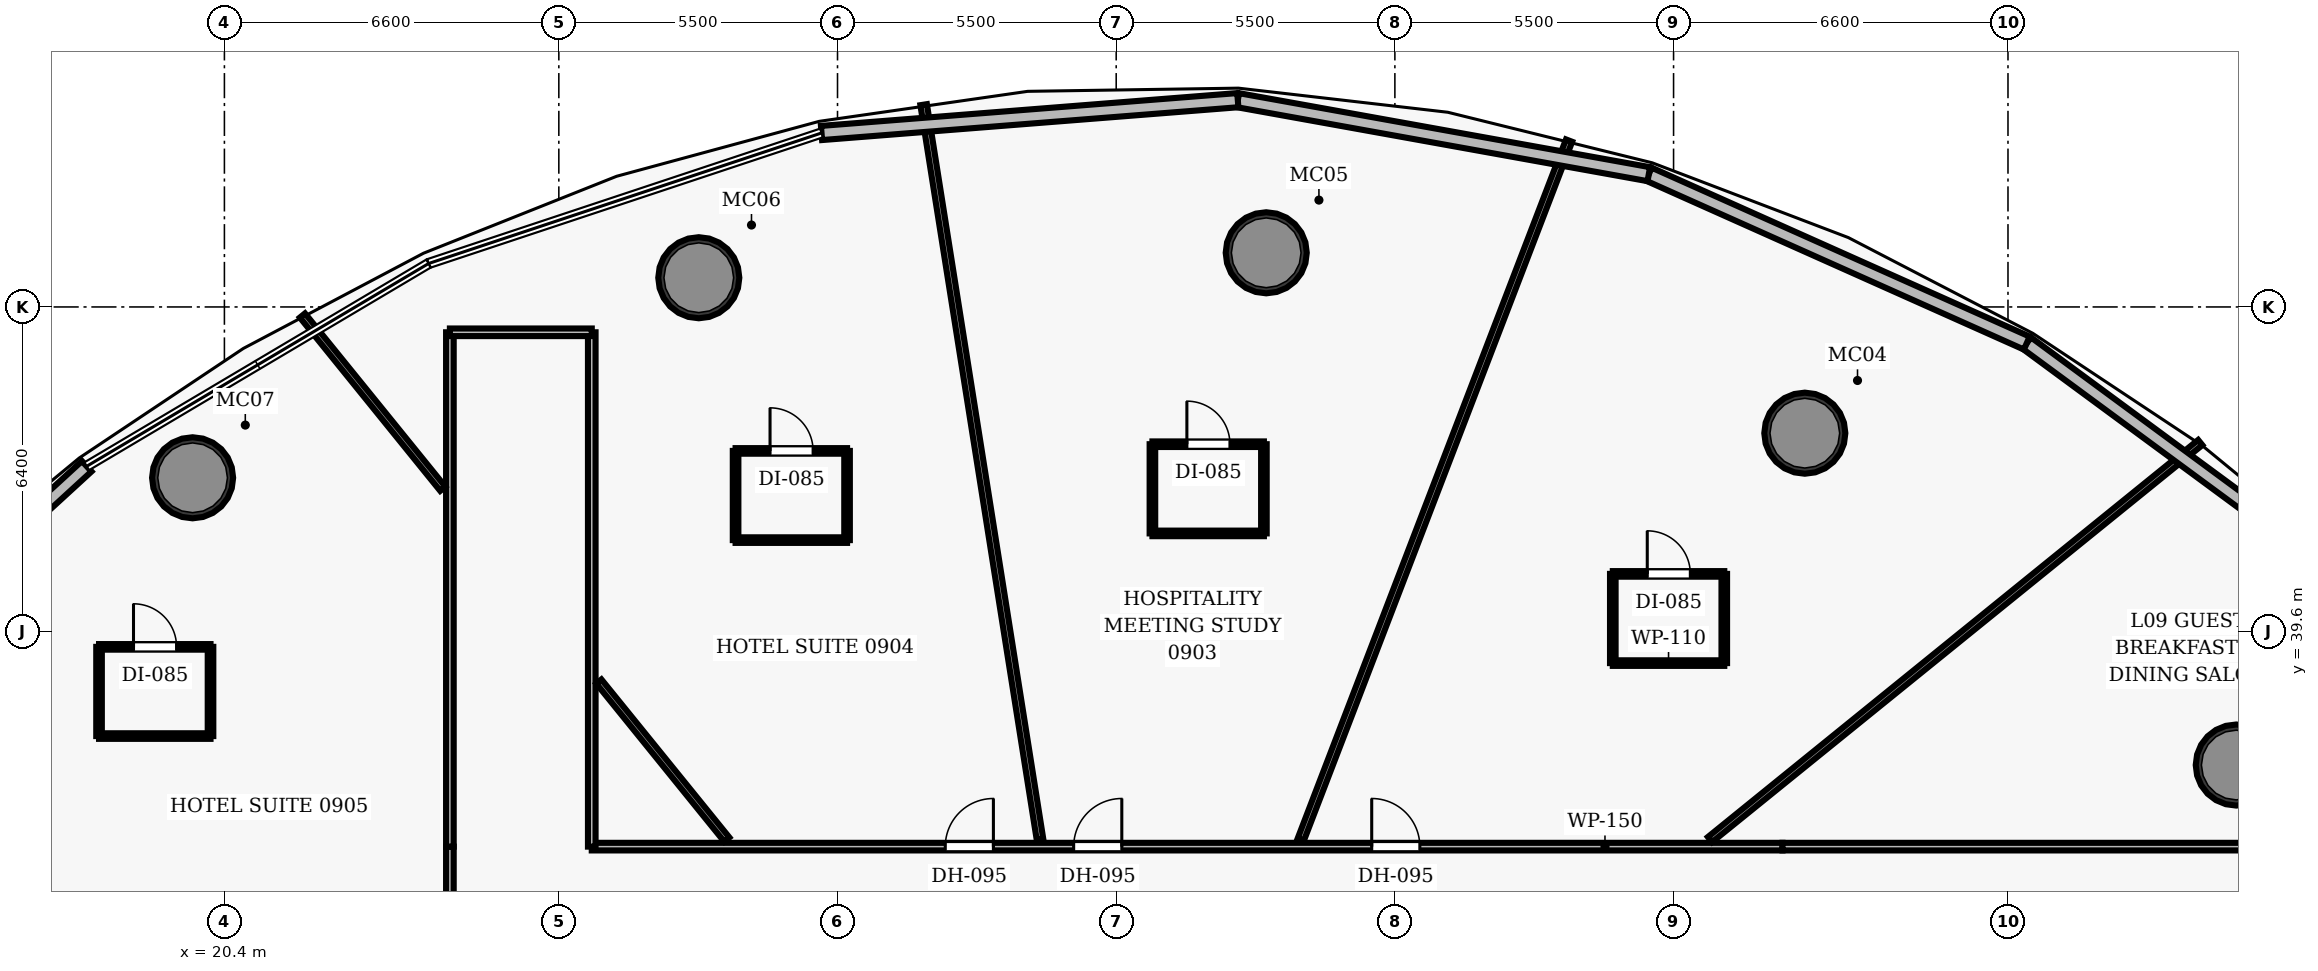
"""IFC4 building model, lengths in metres.
Left out: names, types, materials, properties, quantities, classifications, styles, units other than length and angle.
Written with IfcOpenShell. Run it as: python <this file> out.ifc"""

import sys

from ifc_helpers import new_model, si_unit, direction, frame, frame_2d, origin, origin_2d, place, context, subcontext, project, spatial, rectangle, hollow_circle, extrude, element, fill, save


model = new_model("IFC4")
c1 = context("Model", 3, precision=1e-05, world=origin(), true_north=direction((0.0, 1.0)))
c2 = subcontext(c1, "Body", "Model", "MODEL_VIEW")
j1 = project(units=[si_unit("LENGTHUNIT", "METRE"), si_unit("PLANEANGLEUNIT", "RADIAN")], contexts=[c1])
p1 = place(None, origin())
s1 = spatial("IfcSite", under=j1, at=p1, CompositionType="ELEMENT")
p2 = place(p1, origin())
s2 = spatial("IfcBuilding", under=s1, at=p2, CompositionType="ELEMENT")
p3 = place(p2, frame((0.0, 0.0, 48.4)))
s3 = spatial("IfcBuildingStorey", under=s2, at=p3, CompositionType="ELEMENT", Elevation=48.4)
for number, where, z_axis, x_axis in (
    (1, (60.105, 36.96, 0.0), (0.0, 0.0, 1.0), (1.0, 0.0, 0.0)),
    (2, (51.59, 43.509, 0.0), (0.0, 0.0, 1.0), (1.0, 0.0, 0.0)),
    (3, (40.961, 47.069, 0.0), (0.0, 0.0, 1.0), (1.0, 0.0, 0.0)),
    (4, (29.762, 46.577, 0.0), (0.0, 0.0, 1.0), (1.0, 0.0, 0.0)),
    (5, (19.772, 42.629, 0.0), (0.0, 0.0, 1.0), (1.0, 0.0, 0.0)),
):
    element("IfcColumn", number, at=place(p3, frame(where, z_axis=z_axis, x_axis=x_axis)), inside=s3, PredefinedType="COLUMN", context=c2, shape_type="SweptSolid", body=[
        extrude(hollow_circle(Radius=0.8, WallThickness=0.06, at=origin_2d()), origin(), (0.0, 0.0, 1.0), 3.5),
    ])
p4 = place(p3, frame((27.65, 35.35, 0.0), z_axis=(0.0, 0.0, 1.0), x_axis=(1.0, 0.0, 0.0)))
e6 = element("IfcWall", 6, at=p4, inside=s3, PredefinedType="PARTITIONING", context=c2, shape_type="SweptSolid", body=[
    extrude(rectangle(XDim=23.5, YDim=0.15, at=frame_2d((11.75, 0.0))), origin(), (0.0, 0.0, 1.0), 2.6),
])
p5 = place(p4, frame((15.393, 0.0, 0.0)))
e7 = element("IfcOpeningElement", 7, at=p5, cuts=e6, PredefinedType="OPENING", context=c2, shape_type="SweptSolid", body=[
    extrude(rectangle(XDim=0.95, YDim=2.15, at=frame_2d((0.475, 1.075))), frame((0.0, 0.085, 0.0), z_axis=(0.0, -1.0, 0.0), x_axis=(1.0, 0.0, 0.0)), (0.0, 0.0, 1.0), 0.17),
])
p6 = place(p4, frame((9.511, 0.0, 0.0)))
e8 = element("IfcOpeningElement", 8, at=p6, cuts=e6, PredefinedType="OPENING", context=c2, shape_type="SweptSolid", body=[
    extrude(rectangle(XDim=0.95, YDim=2.15, at=frame_2d((0.475, 1.075))), frame((0.0, 0.085, 0.0), z_axis=(0.0, -1.0, 0.0), x_axis=(1.0, 0.0, 0.0)), (0.0, 0.0, 1.0), 0.17),
])
p7 = place(p4, frame((6.977, 0.0, 0.0)))
e9 = element("IfcOpeningElement", 9, at=p7, cuts=e6, PredefinedType="OPENING", context=c2, shape_type="SweptSolid", body=[
    extrude(rectangle(XDim=0.95, YDim=2.15, at=frame_2d((0.475, 1.075))), frame((0.0, 0.085, 0.0), z_axis=(0.0, -1.0, 0.0), x_axis=(1.0, 0.0, 0.0)), (0.0, 0.0, 1.0), 0.17),
])
p8 = place(p3, frame((24.85, 19.45, 0.0), z_axis=(0.0, 0.0, 1.0), x_axis=(0.0, 1.0, 0.0)))
e10 = element("IfcWall", 10, at=p8, inside=s3, PredefinedType="PARTITIONING", context=c2, shape_type="SweptSolid", body=[
    extrude(rectangle(XDim=15.9, YDim=0.15, at=frame_2d((7.95, 0.0))), origin(), (0.0, 0.0, 1.0), 2.6),
])
p9 = place(p8, frame((12.466, 0.0, 0.0)))
e11 = element("IfcOpeningElement", 11, at=p9, cuts=e10, PredefinedType="OPENING", context=c2, shape_type="SweptSolid", body=[
    extrude(rectangle(XDim=0.95, YDim=2.15, at=frame_2d((0.475, 1.075))), frame((0.0, 0.085, 0.0), z_axis=(0.0, -1.0, 0.0), x_axis=(1.0, 0.0, 0.0)), (0.0, 0.0, 1.0), 0.17),
])
p10 = place(p8, frame((7.571, 0.0, 0.0)))
e12 = element("IfcOpeningElement", 12, at=p10, cuts=e10, PredefinedType="OPENING", context=c2, shape_type="SweptSolid", body=[
    extrude(rectangle(XDim=0.95, YDim=2.15, at=frame_2d((0.475, 1.075))), frame((0.0, 0.085, 0.0), z_axis=(0.0, -1.0, 0.0), x_axis=(1.0, 0.0, 0.0)), (0.0, 0.0, 1.0), 0.17),
])
p11 = place(p8, frame((2.609, 0.0, 0.0)))
e13 = element("IfcOpeningElement", 13, at=p11, cuts=e10, PredefinedType="OPENING", context=c2, shape_type="SweptSolid", body=[
    extrude(rectangle(XDim=0.95, YDim=2.15, at=frame_2d((0.475, 1.075))), frame((0.0, 0.085, 0.0), z_axis=(0.0, -1.0, 0.0), x_axis=(1.0, 0.0, 0.0)), (0.0, 0.0, 1.0), 0.17),
])
p12 = place(p3, frame((51.15, 35.35, 0.0), z_axis=(0.0, 0.0, 1.0), x_axis=(1.0, 0.0, 0.0)))
e14 = element("IfcWall", 14, at=p12, inside=s3, PredefinedType="PARTITIONING", context=c2, shape_type="SweptSolid", body=[
    extrude(rectangle(XDim=14.35, YDim=0.15, at=frame_2d((7.175, 0.0))), origin(), (0.0, 0.0, 1.0), 2.6),
])
for number, where, z_axis, x_axis in (
    (15, (24.85, 35.35, 0.0), (0.0, 0.0, 1.0), (0.0, 1.0, 0.0)),
    (16, (27.65, 35.35, 0.0), (0.0, 0.0, 1.0), (0.0, 1.0, 0.0)),
):
    element("IfcWall", number, at=place(p3, frame(where, z_axis=z_axis, x_axis=x_axis)), inside=s3, PredefinedType="PARTITIONING", context=c2, shape_type="SweptSolid", body=[
        extrude(rectangle(XDim=10.15, YDim=0.15, at=frame_2d((5.075, 0.0))), origin(), (0.0, 0.0, 1.0), 2.6),
    ])
p13 = place(p3, frame((24.85, 45.5, 0.0), z_axis=(0.0, 0.0, 1.0), x_axis=(1.0, 0.0, 0.0)))
e17 = element("IfcWall", 17, at=p13, inside=s3, PredefinedType="PARTITIONING", context=c2, shape_type="SweptSolid", body=[
    extrude(rectangle(XDim=2.8, YDim=0.15, at=frame_2d((1.4, 0.0))), origin(), (0.0, 0.0, 1.0), 2.6),
])
p14 = place(p3, frame((49.719, 35.49, 0.0), z_axis=(0.0, 0.0, 1.0), x_axis=(0.777145304008, 0.62932120293, 0.0)))
e18 = element("IfcWall", 18, at=p14, inside=s3, PredefinedType="PARTITIONING", context=c2, shape_type="SweptSolid", body=[
    extrude(rectangle(XDim=12.449, YDim=0.13, at=frame_2d((6.225, 0.0))), origin(), (0.0, 0.0, 1.0), 2.6),
])
p15 = place(p3, frame((41.643, 35.49, 0.0), z_axis=(0.0, 0.0, 1.0), x_axis=(0.358374426788, 0.933577940091, 0.0)))
e19 = element("IfcWall", 19, at=p15, inside=s3, PredefinedType="PARTITIONING", context=c2, shape_type="SweptSolid", body=[
    extrude(rectangle(XDim=14.775, YDim=0.13, at=frame_2d((7.387, 0.0))), origin(), (0.0, 0.0, 1.0), 2.6),
])
p16 = place(p3, frame((36.497, 35.49, 0.0), z_axis=(0.0, 0.0, 1.0), x_axis=(-0.15643388506, 0.987688432455, 0.0)))
e20 = element("IfcWall", 20, at=p16, inside=s3, PredefinedType="PARTITIONING", context=c2, shape_type="SweptSolid", body=[
    extrude(rectangle(XDim=14.683, YDim=0.13, at=frame_2d((7.341, 0.0))), origin(), (0.0, 0.0, 1.0), 2.6),
])
p17 = place(p3, frame((30.315, 35.49, 0.0), z_axis=(0.0, 0.0, 1.0), x_axis=(-0.629306741086, 0.777157014782, 0.0)))
e21 = element("IfcWall", 21, at=p17, inside=s3, PredefinedType="PARTITIONING", context=c2, shape_type="SweptSolid", body=[
    extrude(rectangle(XDim=4.013, YDim=0.13, at=frame_2d((2.006, 0.0))), origin(), (0.0, 0.0, 1.0), 2.6),
])
p18 = place(p3, frame((24.71, 42.412, 0.0), z_axis=(0.0, 0.0, 1.0), x_axis=(-0.629345031815, 0.777126007112, 0.0)))
e22 = element("IfcWall", 22, at=p18, inside=s3, PredefinedType="PARTITIONING", context=c2, shape_type="SweptSolid", body=[
    extrude(rectangle(XDim=4.401, YDim=0.13, at=frame_2d((2.201, 0.0))), origin(), (0.0, 0.0, 1.0), 2.6),
])
p19 = place(p3, frame((24.71, 31.102, 0.0), z_axis=(0.0, 0.0, 1.0), x_axis=(-0.933582813914, 0.358361730049, 0.0)))
e23 = element("IfcWall", 23, at=p19, inside=s3, PredefinedType="PARTITIONING", context=c2, shape_type="SweptSolid", body=[
    extrude(rectangle(XDim=14.815, YDim=0.13, at=frame_2d((7.408, 0.0))), origin(), (0.0, 0.0, 1.0), 2.6),
])
p20 = place(p3, frame((47.801, 38.972, 0.0), z_axis=(0.0, 0.0, 1.0), x_axis=(1.0, 0.0, 0.0)))
e24 = element("IfcWall", 24, at=p20, inside=s3, PredefinedType="PARTITIONING", context=c2, shape_type="SweptSolid", body=[
    extrude(rectangle(XDim=2.2, YDim=0.11, at=frame_2d((1.1, 0.0))), origin(), (0.0, 0.0, 1.0), 2.6),
])
p21 = place(p3, frame((47.801, 40.732, 0.0), z_axis=(0.0, 0.0, 1.0), x_axis=(1.0, 0.0, 0.0)))
e25 = element("IfcWall", 25, at=p21, inside=s3, PredefinedType="PARTITIONING", context=c2, shape_type="SweptSolid", body=[
    extrude(rectangle(XDim=2.2, YDim=0.11, at=frame_2d((1.1, 0.0))), origin(), (0.0, 0.0, 1.0), 2.6),
])
p22 = place(p21, frame((0.68, 0.0, 0.0)))
e26 = element("IfcOpeningElement", 26, at=p22, cuts=e25, PredefinedType="OPENING", context=c2, shape_type="SweptSolid", body=[
    extrude(rectangle(XDim=0.85, YDim=2.1, at=frame_2d((0.425, 1.05))), frame((0.0, 0.065, 0.0), z_axis=(0.0, -1.0, 0.0), x_axis=(1.0, 0.0, 0.0)), (0.0, 0.0, 1.0), 0.13),
])
for number, where, z_axis, x_axis in (
    (27, (47.801, 38.972, 0.0), (0.0, 0.0, 1.0), (0.0, 1.0, 0.0)),
    (28, (50.001, 38.972, 0.0), (0.0, 0.0, 1.0), (0.0, 1.0, 0.0)),
):
    element("IfcWall", number, at=place(p3, frame(where, z_axis=z_axis, x_axis=x_axis)), inside=s3, PredefinedType="PARTITIONING", context=c2, shape_type="SweptSolid", body=[
        extrude(rectangle(XDim=1.76, YDim=0.11, at=frame_2d((0.88, 0.0))), origin(), (0.0, 0.0, 1.0), 2.6),
    ])
p23 = place(p3, frame((38.715, 41.531, 0.0), z_axis=(0.0, 0.0, 1.0), x_axis=(1.0, 0.0, 0.0)))
e29 = element("IfcWall", 29, at=p23, inside=s3, PredefinedType="PARTITIONING", context=c2, shape_type="SweptSolid", body=[
    extrude(rectangle(XDim=2.2, YDim=0.11, at=frame_2d((1.1, 0.0))), origin(), (0.0, 0.0, 1.0), 2.6),
])
p24 = place(p3, frame((38.715, 43.291, 0.0), z_axis=(0.0, 0.0, 1.0), x_axis=(1.0, 0.0, 0.0)))
e30 = element("IfcWall", 30, at=p24, inside=s3, PredefinedType="PARTITIONING", context=c2, shape_type="SweptSolid", body=[
    extrude(rectangle(XDim=2.2, YDim=0.11, at=frame_2d((1.1, 0.0))), origin(), (0.0, 0.0, 1.0), 2.6),
])
p25 = place(p24, frame((0.68, 0.0, 0.0)))
e31 = element("IfcOpeningElement", 31, at=p25, cuts=e30, PredefinedType="OPENING", context=c2, shape_type="SweptSolid", body=[
    extrude(rectangle(XDim=0.85, YDim=2.1, at=frame_2d((0.425, 1.05))), frame((0.0, 0.065, 0.0), z_axis=(0.0, -1.0, 0.0), x_axis=(1.0, 0.0, 0.0)), (0.0, 0.0, 1.0), 0.13),
])
for number, where, z_axis, x_axis in (
    (32, (38.715, 41.531, 0.0), (0.0, 0.0, 1.0), (0.0, 1.0, 0.0)),
    (33, (40.915, 41.531, 0.0), (0.0, 0.0, 1.0), (0.0, 1.0, 0.0)),
):
    element("IfcWall", number, at=place(p3, frame(where, z_axis=z_axis, x_axis=x_axis)), inside=s3, PredefinedType="PARTITIONING", context=c2, shape_type="SweptSolid", body=[
        extrude(rectangle(XDim=1.76, YDim=0.11, at=frame_2d((0.88, 0.0))), origin(), (0.0, 0.0, 1.0), 2.6),
    ])
p26 = place(p3, frame((30.488, 41.399, 0.0), z_axis=(0.0, 0.0, 1.0), x_axis=(1.0, 0.0, 0.0)))
e34 = element("IfcWall", 34, at=p26, inside=s3, PredefinedType="PARTITIONING", context=c2, shape_type="SweptSolid", body=[
    extrude(rectangle(XDim=2.2, YDim=0.11, at=frame_2d((1.1, 0.0))), origin(), (0.0, 0.0, 1.0), 2.6),
])
p27 = place(p3, frame((30.488, 43.159, 0.0), z_axis=(0.0, 0.0, 1.0), x_axis=(1.0, 0.0, 0.0)))
e35 = element("IfcWall", 35, at=p27, inside=s3, PredefinedType="PARTITIONING", context=c2, shape_type="SweptSolid", body=[
    extrude(rectangle(XDim=2.2, YDim=0.11, at=frame_2d((1.1, 0.0))), origin(), (0.0, 0.0, 1.0), 2.6),
])
p28 = place(p27, frame((0.68, 0.0, 0.0)))
e36 = element("IfcOpeningElement", 36, at=p28, cuts=e35, PredefinedType="OPENING", context=c2, shape_type="SweptSolid", body=[
    extrude(rectangle(XDim=0.85, YDim=2.1, at=frame_2d((0.425, 1.05))), frame((0.0, 0.065, 0.0), z_axis=(0.0, -1.0, 0.0), x_axis=(1.0, 0.0, 0.0)), (0.0, 0.0, 1.0), 0.13),
])
for number, where, z_axis, x_axis in (
    (37, (30.488, 41.399, 0.0), (0.0, 0.0, 1.0), (0.0, 1.0, 0.0)),
    (38, (32.688, 41.399, 0.0), (0.0, 0.0, 1.0), (0.0, 1.0, 0.0)),
):
    element("IfcWall", number, at=place(p3, frame(where, z_axis=z_axis, x_axis=x_axis)), inside=s3, PredefinedType="PARTITIONING", context=c2, shape_type="SweptSolid", body=[
        extrude(rectangle(XDim=1.76, YDim=0.11, at=frame_2d((0.88, 0.0))), origin(), (0.0, 0.0, 1.0), 2.6),
    ])
p29 = place(p3, frame((17.926, 37.532, 0.0), z_axis=(0.0, 0.0, 1.0), x_axis=(1.0, 0.0, 0.0)))
e39 = element("IfcWall", 39, at=p29, inside=s3, PredefinedType="PARTITIONING", context=c2, shape_type="SweptSolid", body=[
    extrude(rectangle(XDim=2.2, YDim=0.11, at=frame_2d((1.1, 0.0))), origin(), (0.0, 0.0, 1.0), 2.6),
])
p30 = place(p3, frame((17.926, 39.292, 0.0), z_axis=(0.0, 0.0, 1.0), x_axis=(1.0, 0.0, 0.0)))
e40 = element("IfcWall", 40, at=p30, inside=s3, PredefinedType="PARTITIONING", context=c2, shape_type="SweptSolid", body=[
    extrude(rectangle(XDim=2.2, YDim=0.11, at=frame_2d((1.1, 0.0))), origin(), (0.0, 0.0, 1.0), 2.6),
])
p31 = place(p30, frame((0.68, 0.0, 0.0)))
e41 = element("IfcOpeningElement", 41, at=p31, cuts=e40, PredefinedType="OPENING", context=c2, shape_type="SweptSolid", body=[
    extrude(rectangle(XDim=0.85, YDim=2.1, at=frame_2d((0.425, 1.05))), frame((0.0, 0.065, 0.0), z_axis=(0.0, -1.0, 0.0), x_axis=(1.0, 0.0, 0.0)), (0.0, 0.0, 1.0), 0.13),
])
for number, where, z_axis, x_axis in (
    (42, (17.926, 37.532, 0.0), (0.0, 0.0, 1.0), (0.0, 1.0, 0.0)),
    (43, (20.126, 37.532, 0.0), (0.0, 0.0, 1.0), (0.0, 1.0, 0.0)),
):
    element("IfcWall", number, at=place(p3, frame(where, z_axis=z_axis, x_axis=x_axis)), inside=s3, PredefinedType="PARTITIONING", context=c2, shape_type="SweptSolid", body=[
        extrude(rectangle(XDim=1.76, YDim=0.11, at=frame_2d((0.88, 0.0))), origin(), (0.0, 0.0, 1.0), 2.6),
    ])
p32 = place(p3, frame((55.971, 45.287, 0.0), z_axis=(0.0, 0.0, 1.0), x_axis=(0.805234930247, -0.592955906547, 0.0)))
e44 = element("IfcWall", 44, at=p32, inside=s3, PredefinedType="SOLIDWALL", context=c2, shape_type="SweptSolid", body=[
    extrude(rectangle(XDim=7.845, YDim=0.28, at=frame_2d((3.922, 0.0))), origin(), (0.0, 0.0, 1.0), 3.25),
])
p33 = place(p3, frame((48.511, 48.621, 0.0), z_axis=(0.0, 0.0, 1.0), x_axis=(0.91299402967, -0.407972917958, 0.0)))
e45 = element("IfcWall", 45, at=p33, inside=s3, PredefinedType="SOLIDWALL", context=c2, shape_type="SweptSolid", body=[
    extrude(rectangle(XDim=8.171, YDim=0.28, at=frame_2d((4.085, 0.0))), origin(), (0.0, 0.0, 1.0), 3.25),
])
p34 = place(p3, frame((40.4, 50.081, 0.0), z_axis=(0.0, 0.0, 1.0), x_axis=(0.984177951896, -0.177182840596, 0.0)))
e46 = element("IfcWall", 46, at=p34, inside=s3, PredefinedType="SOLIDWALL", context=c2, shape_type="SweptSolid", body=[
    extrude(rectangle(XDim=8.241, YDim=0.28, at=frame_2d((4.121, 0.0))), origin(), (0.0, 0.0, 1.0), 3.25),
])
p35 = place(p3, frame((32.184, 49.433, 0.0), z_axis=(0.0, 0.0, 1.0), x_axis=(0.996909331369, 0.078560709202, 0.0)))
e47 = element("IfcWall", 47, at=p35, inside=s3, PredefinedType="SOLIDWALL", context=c2, shape_type="SweptSolid", body=[
    extrude(rectangle(XDim=8.241, YDim=0.28, at=frame_2d((4.121, 0.0))), origin(), (0.0, 0.0, 1.0), 3.25),
])
p36 = place(p3, frame((12.417, 38.029, 0.0), z_axis=(0.0, 0.0, 1.0), x_axis=(0.73711725093, 0.675764869153, 0.0)))
e48 = element("IfcWall", 48, at=p36, inside=s3, PredefinedType="SOLIDWALL", context=c2, shape_type="SweptSolid", body=[
    extrude(rectangle(XDim=7.143, YDim=0.28, at=frame_2d((3.571, 0.0))), origin(), (0.0, 0.0, 1.0), 3.25),
])
p37 = place(p5, origin())
e49 = element("IfcDoor", 49, at=p37, inside=s3, OperationType="SINGLE_SWING_LEFT", PredefinedType="DOOR", context=c2, shape_type="SweptSolid", body=[
    extrude(rectangle(XDim=0.95, YDim=2.15, at=frame_2d((0.475, 1.075))), frame((0.0, 0.025, 0.0), z_axis=(0.0, -1.0, 0.0), x_axis=(1.0, 0.0, 0.0)), (0.0, 0.0, 1.0), 0.05),
])
fill(e7, e49)
p38 = place(p22, origin())
e50 = element("IfcDoor", 50, at=p38, inside=s3, OperationType="SINGLE_SWING_LEFT", PredefinedType="DOOR", context=c2, shape_type="SweptSolid", body=[
    extrude(rectangle(XDim=0.85, YDim=2.1, at=frame_2d((0.425, 1.05))), frame((0.0, 0.025, 0.0), z_axis=(0.0, -1.0, 0.0), x_axis=(1.0, 0.0, 0.0)), (0.0, 0.0, 1.0), 0.05),
])
fill(e26, e50)
p39 = place(p6, origin())
e51 = element("IfcDoor", 51, at=p39, inside=s3, OperationType="SINGLE_SWING_RIGHT", PredefinedType="DOOR", context=c2, shape_type="SweptSolid", body=[
    extrude(rectangle(XDim=0.95, YDim=2.15, at=frame_2d((0.475, 1.075))), frame((0.0, 0.025, 0.0), z_axis=(0.0, -1.0, 0.0), x_axis=(1.0, 0.0, 0.0)), (0.0, 0.0, 1.0), 0.05),
])
fill(e8, e51)
p40 = place(p25, origin())
e52 = element("IfcDoor", 52, at=p40, inside=s3, OperationType="SINGLE_SWING_LEFT", PredefinedType="DOOR", context=c2, shape_type="SweptSolid", body=[
    extrude(rectangle(XDim=0.85, YDim=2.1, at=frame_2d((0.425, 1.05))), frame((0.0, 0.025, 0.0), z_axis=(0.0, -1.0, 0.0), x_axis=(1.0, 0.0, 0.0)), (0.0, 0.0, 1.0), 0.05),
])
fill(e31, e52)
p41 = place(p7, origin())
e53 = element("IfcDoor", 53, at=p41, inside=s3, OperationType="SINGLE_SWING_RIGHT", PredefinedType="DOOR", context=c2, shape_type="SweptSolid", body=[
    extrude(rectangle(XDim=0.95, YDim=2.15, at=frame_2d((0.475, 1.075))), frame((0.0, 0.025, 0.0), z_axis=(0.0, -1.0, 0.0), x_axis=(1.0, 0.0, 0.0)), (0.0, 0.0, 1.0), 0.05),
])
fill(e9, e53)
p42 = place(p28, origin())
e54 = element("IfcDoor", 54, at=p42, inside=s3, OperationType="SINGLE_SWING_LEFT", PredefinedType="DOOR", context=c2, shape_type="SweptSolid", body=[
    extrude(rectangle(XDim=0.85, YDim=2.1, at=frame_2d((0.425, 1.05))), frame((0.0, 0.025, 0.0), z_axis=(0.0, -1.0, 0.0), x_axis=(1.0, 0.0, 0.0)), (0.0, 0.0, 1.0), 0.05),
])
fill(e36, e54)
p43 = place(p31, origin())
e55 = element("IfcDoor", 55, at=p43, inside=s3, OperationType="SINGLE_SWING_LEFT", PredefinedType="DOOR", context=c2, shape_type="SweptSolid", body=[
    extrude(rectangle(XDim=0.85, YDim=2.1, at=frame_2d((0.425, 1.05))), frame((0.0, 0.025, 0.0), z_axis=(0.0, -1.0, 0.0), x_axis=(1.0, 0.0, 0.0)), (0.0, 0.0, 1.0), 0.05),
])
fill(e41, e55)
save(model, sys.argv[1])
